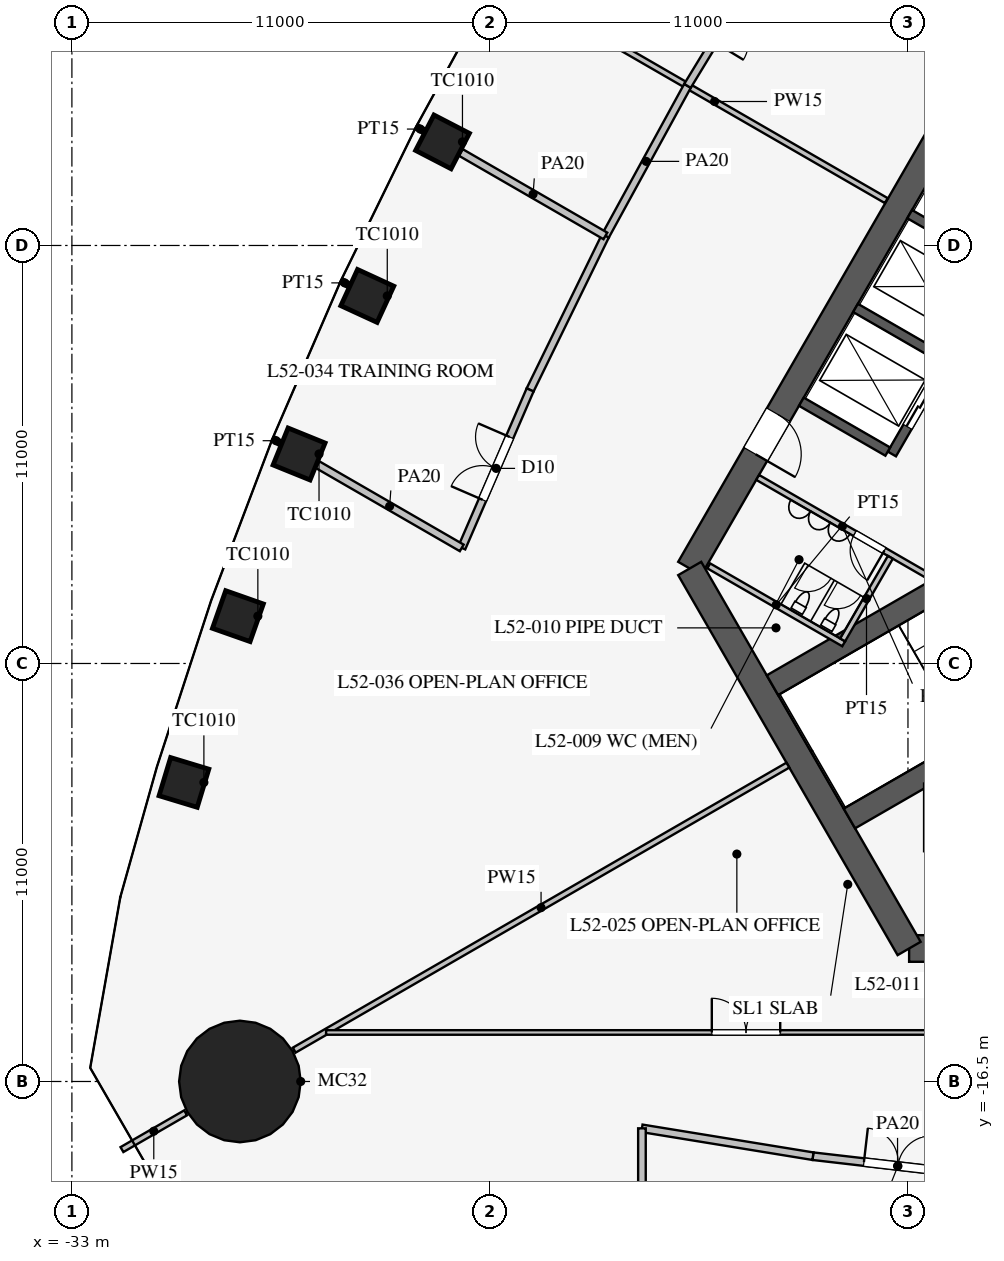
"""IFC4 building model, lengths in metres.
Left out: names, types, materials, properties, quantities, classifications, styles, units other than length and angle.
Written with IfcOpenShell. Run it as: python <this file> out.ifc"""

import sys

from ifc_helpers import new_model, si_unit, direction, frame, frame_2d, origin, origin_2d, place, context, subcontext, project, spatial, rectangle, circle, extrude, element, fill, save


model = new_model("IFC4")
c1 = context("Model", 3, precision=1e-05, world=origin(), true_north=direction((0.0, 1.0)))
c2 = subcontext(c1, "Body", "Model", "MODEL_VIEW")
j1 = project(units=[si_unit("LENGTHUNIT", "METRE"), si_unit("PLANEANGLEUNIT", "RADIAN")], contexts=[c1])
p1 = place(None, origin())
s1 = spatial("IfcSite", under=j1, at=p1, CompositionType="ELEMENT")
p2 = place(p1, origin())
s2 = spatial("IfcBuilding", under=s1, at=p2, CompositionType="ELEMENT")
p3 = place(p2, frame((0.0, 0.0, 227.5)))
s3 = spatial("IfcBuildingStorey", under=s2, at=p3, CompositionType="ELEMENT", Elevation=227.5)
for number, where, z_axis, x_axis in (
    (1, (-23.248, 8.226, 0.0), (0.0, 0.0, 1.0), (-0.46, -0.888, 0.0)),
    (2, (-25.227, 4.172, 0.0), (0.0, 0.0, 1.0), (-0.418, -0.908, 0.0)),
    (3, (-27.022, 0.013, 0.0), (0.0, 0.0, 1.0), (-0.376, -0.927, 0.0)),
    (4, (-28.632, -4.254, 0.0), (0.0, 0.0, 1.0), (-0.332, -0.943, 0.0)),
    (5, (-30.052, -8.63, 0.0), (0.0, 0.0, 1.0), (-0.29, -0.957, 0.0)),
):
    element("IfcColumn", number, at=place(p3, frame(where, z_axis=z_axis, x_axis=x_axis)), inside=s3, PredefinedType="COLUMN", context=c2, shape_type="SweptSolid", body=[
        extrude(rectangle(XDim=1.05, YDim=1.05, at=origin_2d()), origin(), (0.0, 0.0, 1.0), 4.2),
    ])
p4 = place(p3, frame((-28.579, -16.5, 0.0), z_axis=(0.0, 0.0, 1.0), x_axis=(1.0, 0.0, 0.0)))
e6 = element("IfcColumn", 6, at=p4, inside=s3, PredefinedType="COLUMN", context=c2, shape_type="SweptSolid", body=[
    extrude(circle(Radius=1.6, at=origin_2d()), origin(), (0.0, 0.0, 1.0), 4.2),
])
p5 = place(p3, frame((-10.97, -13.0, 0.0), z_axis=(0.0, 0.0, 1.0), x_axis=(1.0, 0.0, 0.0)))
e7 = element("IfcWall", 7, at=p5, inside=s3, PredefinedType="SHEAR", context=c2, shape_type="SweptSolid", body=[
    extrude(rectangle(XDim=21.939, YDim=0.7, at=frame_2d((10.97, 0.0))), origin(), (0.0, 0.0, 1.0), 4.2),
])
p6 = place(p5, frame((17.27, 0.0, 0.0)))
e8 = element("IfcOpeningElement", 8, at=p6, cuts=e7, PredefinedType="OPENING", context=c2, shape_type="SweptSolid", body=[
    extrude(rectangle(XDim=1.2, YDim=2.1, at=frame_2d((0.6, 1.05))), frame((0.0, 0.36, 0.0), z_axis=(0.0, -1.0, 0.0), x_axis=(1.0, 0.0, 0.0)), (0.0, 0.0, 1.0), 0.72),
])
p7 = place(p5, frame((3.47, 0.0, 0.0)))
e9 = element("IfcOpeningElement", 9, at=p7, cuts=e7, PredefinedType="OPENING", context=c2, shape_type="SweptSolid", body=[
    extrude(rectangle(XDim=1.2, YDim=2.1, at=frame_2d((0.6, 1.05))), frame((0.0, 0.36, 0.0), z_axis=(0.0, -1.0, 0.0), x_axis=(1.0, 0.0, 0.0)), (0.0, 0.0, 1.0), 0.72),
])
p8 = place(p3, frame((-5.773, 16.0, 0.0), z_axis=(0.0, 0.0, 1.0), x_axis=(-0.500002442456, -0.866023993627, 0.0)))
e10 = element("IfcWall", 10, at=p8, inside=s3, PredefinedType="SHEAR", context=c2, shape_type="SweptSolid", body=[
    extrude(rectangle(XDim=21.939, YDim=0.7, at=frame_2d((10.97, 0.0))), origin(), (0.0, 0.0, 1.0), 4.2),
])
p9 = place(p8, frame((17.27, 0.0, 0.0)))
e11 = element("IfcOpeningElement", 11, at=p9, cuts=e10, PredefinedType="OPENING", context=c2, shape_type="SweptSolid", body=[
    extrude(rectangle(XDim=1.2, YDim=2.1, at=frame_2d((0.6, 1.05))), frame((0.0, 0.36, 0.0), z_axis=(0.0, -1.0, 0.0), x_axis=(1.0, 0.0, 0.0)), (0.0, 0.0, 1.0), 0.72),
])
p10 = place(p8, frame((3.47, 0.0, 0.0)))
e12 = element("IfcOpeningElement", 12, at=p10, cuts=e10, PredefinedType="OPENING", context=c2, shape_type="SweptSolid", body=[
    extrude(rectangle(XDim=1.2, YDim=2.1, at=frame_2d((0.6, 1.05))), frame((0.0, 0.36, 0.0), z_axis=(0.0, -1.0, 0.0), x_axis=(1.0, 0.0, 0.0)), (0.0, 0.0, 1.0), 0.72),
])
p11 = place(p3, frame((-16.743, -3.0, 0.0), z_axis=(0.0, 0.0, 1.0), x_axis=(0.499995765644, -0.866027848477, 0.0)))
e13 = element("IfcWall", 13, at=p11, inside=s3, PredefinedType="SHEAR", context=c2, shape_type="SweptSolid", body=[
    extrude(rectangle(XDim=11.547, YDim=0.7, at=frame_2d((5.773, 0.0))), origin(), (0.0, 0.0, 1.0), 4.2),
])
p12 = place(p3, frame((-5.724, 9.886, 0.0), z_axis=(0.0, 0.0, 1.0), x_axis=(-0.500001763848, -0.866024385424, 0.0)))
e14 = element("IfcWall", 14, at=p12, inside=s3, PredefinedType="SHEAR", context=c2, shape_type="SweptSolid", body=[
    extrude(rectangle(XDim=11.4, YDim=0.25, at=frame_2d((5.7, 0.0))), origin(), (0.0, 0.0, 1.0), 4.2),
])
p13 = place(p12, frame((6.525, 0.0, 0.0)))
e15 = element("IfcOpeningElement", 15, at=p13, cuts=e14, PredefinedType="OPENING", context=c2, shape_type="SweptSolid", body=[
    extrude(rectangle(XDim=1.2, YDim=2.2, at=frame_2d((0.6, 1.1))), frame((0.0, 0.135, 0.0), z_axis=(0.0, -1.0, 0.0), x_axis=(1.0, 0.0, 0.0)), (0.0, 0.0, 1.0), 0.27),
])
p14 = place(p12, frame((9.375, 0.0, 0.0)))
e16 = element("IfcOpeningElement", 16, at=p14, cuts=e14, PredefinedType="OPENING", context=c2, shape_type="SweptSolid", body=[
    extrude(rectangle(XDim=1.2, YDim=2.2, at=frame_2d((0.6, 1.1))), frame((0.0, 0.135, 0.0), z_axis=(0.0, -1.0, 0.0), x_axis=(1.0, 0.0, 0.0)), (0.0, 0.0, 1.0), 0.27),
])
for number, where, z_axis, x_axis in (
    (17, (-8.682, 5.012, 0.0), (0.0, 0.0, 1.0), (-0.866, 0.5, 0.0)),
    (18, (-10.107, 2.544, 0.0), (0.0, 0.0, 1.0), (-0.866, 0.5, 0.0)),
    (19, (-11.532, 0.076, 0.0), (0.0, 0.0, 1.0), (-0.866, 0.5, 0.0)),
):
    element("IfcWall", number, at=place(p3, frame(where, z_axis=z_axis, x_axis=x_axis)), inside=s3, PredefinedType="SHEAR", context=c2, shape_type="SweptSolid", body=[
        extrude(rectangle(XDim=2.625, YDim=0.25, at=frame_2d((1.312, 0.0))), origin(), (0.0, 0.0, 1.0), 4.2),
    ])
for number, where, z_axis, x_axis in (
    (20, (-6.663, -1.509, 0.0), (0.0, 0.0, 1.0), (-0.866, -0.5, 0.0)),
    (21, (-4.638, -5.016, 0.0), (0.0, 0.0, 1.0), (-0.866, -0.5, 0.0)),
):
    element("IfcWall", number, at=place(p3, frame(where, z_axis=z_axis, x_axis=x_axis)), inside=s3, PredefinedType="SHEAR", context=c2, shape_type="SweptSolid", body=[
        extrude(rectangle(XDim=9.125, YDim=0.6, at=frame_2d((4.562, 0.0))), origin(), (0.0, 0.0, 1.0), 4.2),
    ])
p15 = place(p3, frame((-10.495, -3.178, 0.0), z_axis=(0.0, 0.0, 1.0), x_axis=(-0.866037967349, 0.499978238636, 0.0)))
e22 = element("IfcWall", 22, at=p15, inside=s3, PredefinedType="PARTITIONING", context=c2, shape_type="SweptSolid", body=[
    extrude(rectangle(XDim=5.15, YDim=0.15, at=frame_2d((2.575, 0.0))), origin(), (0.0, 0.0, 1.0), 4.0),
])
p16 = place(p15, frame((1.3, 0.0, 0.0)))
e23 = element("IfcOpeningElement", 23, at=p16, cuts=e22, PredefinedType="OPENING", context=c2, shape_type="SweptSolid", body=[
    extrude(rectangle(XDim=0.9, YDim=2.1, at=frame_2d((0.45, 1.05))), frame((0.0, 0.085, 0.0), z_axis=(0.0, -1.0, 0.0), x_axis=(1.0, 0.0, 0.0)), (0.0, 0.0, 1.0), 0.17),
])
p17 = place(p3, frame((-12.691, -4.982, 0.0), z_axis=(0.0, 0.0, 1.0), x_axis=(-0.8660249478, 0.500000789788, 0.0)))
e24 = element("IfcWall", 24, at=p17, inside=s3, PredefinedType="PARTITIONING", context=c2, shape_type="SweptSolid", body=[
    extrude(rectangle(XDim=4.1, YDim=0.15, at=frame_2d((2.05, 0.0))), origin(), (0.0, 0.0, 1.0), 4.0),
])
p18 = place(p3, frame((-11.464, -2.706, 0.0), z_axis=(0.0, 0.0, 1.0), x_axis=(-0.50001992892, -0.866013897511, 0.0)))
e25 = element("IfcWall", 25, at=p18, inside=s3, PredefinedType="PARTITIONING", context=c2, shape_type="SweptSolid", body=[
    extrude(rectangle(XDim=2.51, YDim=0.15, at=frame_2d((1.255, 0.0))), origin(), (0.0, 0.0, 1.0), 4.0),
])
p19 = place(p3, frame((-14.159, -8.175, 0.0), z_axis=(0.0, 0.0, 1.0), x_axis=(-0.866027028085, -0.499997186618, 0.0)))
e26 = element("IfcWall", 26, at=p19, inside=s3, PredefinedType="PARTITIONING", context=c2, shape_type="SweptSolid", body=[
    extrude(rectangle(XDim=15.0, YDim=0.15, at=frame_2d((7.5, 0.0))), origin(), (0.0, 0.0, 1.0), 2.4),
])
p20 = place(p3, frame((-30.008, -17.325, 0.0), z_axis=(0.0, 0.0, 1.0), x_axis=(-0.866013246922, -0.500021055713, 0.0)))
e27 = element("IfcWall", 27, at=p20, inside=s3, PredefinedType="PARTITIONING", context=c2, shape_type="SweptSolid", body=[
    extrude(rectangle(XDim=1.935, YDim=0.15, at=frame_2d((0.967, 0.0))), origin(), (0.0, 0.0, 1.0), 2.4),
])
p21 = place(p3, frame((-26.312, -15.21, 0.0), z_axis=(0.0, 0.0, 1.0), x_axis=(1.0, 0.0, 0.0)))
e28 = element("IfcWall", 28, at=p21, inside=s3, PredefinedType="PARTITIONING", context=c2, shape_type="SweptSolid", body=[
    extrude(rectangle(XDim=52.624, YDim=0.12, at=frame_2d((26.312, 0.0))), origin(), (0.0, 0.0, 1.0), 2.9),
])
p22 = place(p21, frame((10.15, 0.0, 0.15)))
e29 = element("IfcOpeningElement", 29, at=p22, cuts=e28, PredefinedType="OPENING", context=c2, shape_type="SweptSolid", body=[
    extrude(rectangle(XDim=1.8, YDim=2.1, at=frame_2d((0.9, 1.05))), frame((0.0, 0.07, 0.0), z_axis=(0.0, -1.0, 0.0), x_axis=(1.0, 0.0, 0.0)), (0.0, 0.0, 1.0), 0.14),
])
p23 = place(p21, frame((40.65, 0.0, 0.15)))
e30 = element("IfcOpeningElement", 30, at=p23, cuts=e28, PredefinedType="OPENING", context=c2, shape_type="SweptSolid", body=[
    extrude(rectangle(XDim=1.8, YDim=2.1, at=frame_2d((0.9, 1.05))), frame((0.0, 0.07, 0.0), z_axis=(0.0, -1.0, 0.0), x_axis=(1.0, 0.0, 0.0)), (0.0, 0.0, 1.0), 0.14),
])
p24 = place(p3, frame((-13.5, -18.466, 0.0), z_axis=(0.0, 0.0, 1.0), x_axis=(0.993382946625, -0.114849124309, 0.0)))
e31 = element("IfcWall", 31, at=p24, inside=s3, PredefinedType="PARTITIONING", context=c2, shape_type="SweptSolid", body=[
    extrude(rectangle(XDim=4.53, YDim=0.2, at=frame_2d((2.265, 0.0))), origin(), (0.0, 0.0, 1.0), 2.9),
])
p25 = place(p24, frame((1.35, 0.0, 0.15)))
e32 = element("IfcOpeningElement", 32, at=p25, cuts=e31, PredefinedType="OPENING", context=c2, shape_type="SweptSolid", body=[
    extrude(rectangle(XDim=1.8, YDim=2.1, at=frame_2d((0.9, 1.05))), frame((0.0, 0.11, 0.0), z_axis=(0.0, -1.0, 0.0), x_axis=(1.0, 0.0, 0.0)), (0.0, 0.0, 1.0), 0.22),
])
p26 = place(p3, frame((-18.0, -17.733, 0.0), z_axis=(0.0, 0.0, 1.0), x_axis=(0.986986525477, -0.160802980469, 0.0)))
e33 = element("IfcWall", 33, at=p26, inside=s3, PredefinedType="PARTITIONING", context=c2, shape_type="SweptSolid", body=[
    extrude(rectangle(XDim=4.559, YDim=0.2, at=frame_2d((2.28, 0.0))), origin(), (0.0, 0.0, 1.0), 2.9),
])
p27 = place(p3, frame((-18.0, -17.733, 0.0), z_axis=(0.0, 0.0, 1.0), x_axis=(0.0, -1.0, 0.0)))
e34 = element("IfcWall", 34, at=p27, inside=s3, PredefinedType="PARTITIONING", context=c2, shape_type="SweptSolid", body=[
    extrude(rectangle(XDim=4.372, YDim=0.2, at=frame_2d((2.186, 0.0))), origin(), (0.0, 0.0, 1.0), 2.9),
])
p28 = place(p3, frame((-11.57, 6.68, 0.0), z_axis=(0.0, 0.0, 1.0), x_axis=(-0.866028972293, 0.499993819111, 0.0)))
e35 = element("IfcWall", 35, at=p28, inside=s3, PredefinedType="PARTITIONING", context=c2, shape_type="SweptSolid", body=[
    extrude(rectangle(XDim=10.436, YDim=0.15, at=frame_2d((5.218, 0.0))), origin(), (0.0, 0.0, 1.0), 3.3),
])
p29 = place(p3, frame((-27.539, 0.311, 0.0), z_axis=(0.0, 0.0, 1.0), x_axis=(-0.865534352121, 0.500849563539, 0.0)))
e36 = element("IfcWall", 36, at=p29, inside=s3, PredefinedType="PARTITIONING", context=c2, shape_type="SweptSolid", body=[
    extrude(rectangle(XDim=0.206, YDim=0.15, at=frame_2d((0.103, 0.0))), origin(), (0.0, 0.0, 1.0), 2.9),
])
p30 = place(p3, frame((-23.727, 8.502, 0.0), z_axis=(0.0, 0.0, 1.0), x_axis=(-0.866135455726, 0.499809335981, 0.0)))
e37 = element("IfcWall", 37, at=p30, inside=s3, PredefinedType="PARTITIONING", context=c2, shape_type="SweptSolid", body=[
    extrude(rectangle(XDim=0.243, YDim=0.15, at=frame_2d((0.122, 0.0))), origin(), (0.0, 0.0, 1.0), 2.9),
])
p31 = place(p3, frame((-25.725, 4.46, 0.0), z_axis=(0.0, 0.0, 1.0), x_axis=(-0.865675623716, 0.500605348058, 0.0)))
e38 = element("IfcWall", 38, at=p31, inside=s3, PredefinedType="PARTITIONING", context=c2, shape_type="SweptSolid", body=[
    extrude(rectangle(XDim=0.223, YDim=0.15, at=frame_2d((0.112, 0.0))), origin(), (0.0, 0.0, 1.0), 2.9),
])
p32 = place(p3, frame((-16.802, 9.7, 0.0), z_axis=(0.0, 0.0, 1.0), x_axis=(-0.479949984371, -0.877295852322, 0.0)))
e39 = element("IfcWall", 39, at=p32, inside=s3, PredefinedType="PARTITIONING", context=c2, shape_type="SweptSolid", body=[
    extrude(rectangle(XDim=4.501, YDim=0.2, at=frame_2d((2.25, 0.0))), origin(), (0.0, 0.0, 1.0), 2.9),
])
p33 = place(p3, frame((-18.962, 5.751, 0.0), z_axis=(0.0, 0.0, 1.0), x_axis=(-0.43911984878, -0.898428493764, 0.0)))
e40 = element("IfcWall", 40, at=p33, inside=s3, PredefinedType="PARTITIONING", context=c2, shape_type="SweptSolid", body=[
    extrude(rectangle(XDim=4.511, YDim=0.2, at=frame_2d((2.255, 0.0))), origin(), (0.0, 0.0, 1.0), 2.9),
])
p34 = place(p3, frame((-20.943, 1.699, 0.0), z_axis=(0.0, 0.0, 1.0), x_axis=(-0.397253491631, -0.917708920839, 0.0)))
e41 = element("IfcWall", 41, at=p34, inside=s3, PredefinedType="PARTITIONING", context=c2, shape_type="SweptSolid", body=[
    extrude(rectangle(XDim=4.53, YDim=0.2, at=frame_2d((2.265, 0.0))), origin(), (0.0, 0.0, 1.0), 2.9),
])
p35 = place(p34, frame((1.35, 0.0, 0.15)))
e42 = element("IfcOpeningElement", 42, at=p35, cuts=e41, PredefinedType="OPENING", context=c2, shape_type="SweptSolid", body=[
    extrude(rectangle(XDim=1.8, YDim=2.1, at=frame_2d((0.9, 1.05))), frame((0.0, 0.11, 0.0), z_axis=(0.0, -1.0, 0.0), x_axis=(1.0, 0.0, 0.0)), (0.0, 0.0, 1.0), 0.22),
])
p36 = place(p3, frame((-14.462, 13.546, 0.0), z_axis=(0.0, 0.0, 1.0), x_axis=(-0.519790350351, -0.85429385558, 0.0)))
e43 = element("IfcWall", 43, at=p36, inside=s3, PredefinedType="PARTITIONING", context=c2, shape_type="SweptSolid", body=[
    extrude(rectangle(XDim=4.501, YDim=0.2, at=frame_2d((2.25, 0.0))), origin(), (0.0, 0.0, 1.0), 2.9),
])
p37 = place(p36, frame((1.35, 0.0, 0.15)))
e44 = element("IfcOpeningElement", 44, at=p37, cuts=e43, PredefinedType="OPENING", context=c2, shape_type="SweptSolid", body=[
    extrude(rectangle(XDim=1.8, YDim=2.1, at=frame_2d((0.9, 1.05))), frame((0.0, 0.11, 0.0), z_axis=(0.0, -1.0, 0.0), x_axis=(1.0, 0.0, 0.0)), (0.0, 0.0, 1.0), 0.22),
])
p38 = place(p3, frame((-22.742, -2.458, 0.0), z_axis=(0.0, 0.0, 1.0), x_axis=(-0.866033427365, 0.499986102494, 0.0)))
e45 = element("IfcWall", 45, at=p38, inside=s3, PredefinedType="PARTITIONING", context=c2, shape_type="SweptSolid", body=[
    extrude(rectangle(XDim=4.382, YDim=0.2, at=frame_2d((2.191, 0.0))), origin(), (0.0, 0.0, 1.0), 2.9),
])
p39 = place(p3, frame((-18.962, 5.751, 0.0), z_axis=(0.0, 0.0, 1.0), x_axis=(-0.866025498715, 0.499999835575, 0.0)))
e46 = element("IfcWall", 46, at=p39, inside=s3, PredefinedType="PARTITIONING", context=c2, shape_type="SweptSolid", body=[
    extrude(rectangle(XDim=4.394, YDim=0.2, at=frame_2d((2.197, 0.0))), origin(), (0.0, 0.0, 1.0), 2.9),
])
p40 = place(p16, origin())
e47 = element("IfcDoor", 47, at=p40, inside=s3, OperationType="SINGLE_SWING_LEFT", PredefinedType="DOOR", context=c2, shape_type="SweptSolid", body=[
    extrude(rectangle(XDim=0.9, YDim=2.1, at=frame_2d((0.45, 1.05))), frame((0.0, 0.025, 0.0), z_axis=(0.0, -1.0, 0.0), x_axis=(1.0, 0.0, 0.0)), (0.0, 0.0, 1.0), 0.05),
])
fill(e23, e47)
p41 = place(p9, origin())
e48 = element("IfcDoor", 48, at=p41, inside=s3, OperationType="SINGLE_SWING_RIGHT", PredefinedType="DOOR", context=c2, shape_type="SweptSolid", body=[
    extrude(rectangle(XDim=1.2, YDim=2.1, at=frame_2d((0.6, 1.05))), frame((0.0, 0.025, 0.0), z_axis=(0.0, -1.0, 0.0), x_axis=(1.0, 0.0, 0.0)), (0.0, 0.0, 1.0), 0.05),
])
fill(e11, e48)
p42 = place(p25, origin())
e49 = element("IfcDoor", 49, at=p42, inside=s3, OperationType="DOUBLE_DOOR_SINGLE_SWING", PredefinedType="DOOR", context=c2, shape_type="SweptSolid", body=[
    extrude(rectangle(XDim=1.8, YDim=2.1, at=frame_2d((0.9, 1.05))), frame((0.0, 0.025, 0.0), z_axis=(0.0, -1.0, 0.0), x_axis=(1.0, 0.0, 0.0)), (0.0, 0.0, 1.0), 0.05),
])
fill(e32, e49)
p43 = place(p22, origin())
e50 = element("IfcDoor", 50, at=p43, inside=s3, OperationType="DOUBLE_DOOR_SINGLE_SWING", PredefinedType="DOOR", context=c2, shape_type="SweptSolid", body=[
    extrude(rectangle(XDim=1.8, YDim=2.1, at=frame_2d((0.9, 1.05))), frame((0.0, 0.025, 0.0), z_axis=(0.0, -1.0, 0.0), x_axis=(1.0, 0.0, 0.0)), (0.0, 0.0, 1.0), 0.05),
])
fill(e29, e50)
p44 = place(p35, frame((1.8, 0.0, 0.0), z_axis=(0.0, 0.0, 1.0), x_axis=(-1.0, 0.0, 0.0)))
e51 = element("IfcDoor", 51, at=p44, inside=s3, OperationType="DOUBLE_DOOR_SINGLE_SWING", PredefinedType="DOOR", context=c2, shape_type="SweptSolid", body=[
    extrude(rectangle(XDim=1.8, YDim=2.1, at=frame_2d((0.9, 1.05))), frame((0.0, 0.025, 0.0), z_axis=(0.0, -1.0, 0.0), x_axis=(1.0, 0.0, 0.0)), (0.0, 0.0, 1.0), 0.05),
])
fill(e42, e51)
p45 = place(p14, origin())
e52 = element("IfcDoor", 52, at=p45, inside=s3, OperationType="DOUBLE_DOOR_SLIDING", PredefinedType="DOOR", context=c2, shape_type="SweptSolid", body=[
    extrude(rectangle(XDim=1.2, YDim=2.2, at=frame_2d((0.6, 1.1))), frame((0.0, 0.025, 0.0), z_axis=(0.0, -1.0, 0.0), x_axis=(1.0, 0.0, 0.0)), (0.0, 0.0, 1.0), 0.05),
])
fill(e16, e52)
save(model, sys.argv[1])
